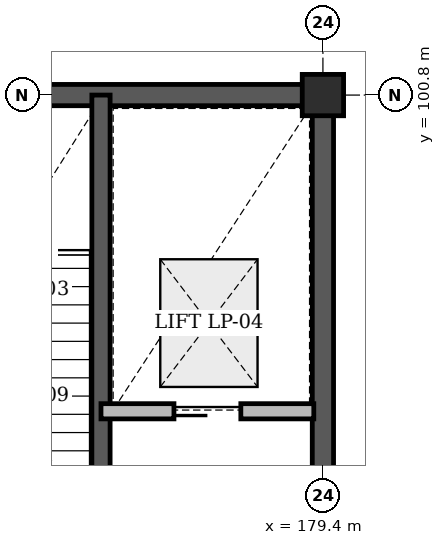
"""IFC4 building model, lengths in metres.
Left out: names, types, materials, properties, quantities, classifications, styles, units other than length and angle.
Written with IfcOpenShell. Run it as: python <this file> out.ifc"""

import sys

from ifc_helpers import new_model, si_unit, direction, frame, frame_2d, origin, origin_2d, place, context, subcontext, project, spatial, rectangle, extrude, element, fill, save


model = new_model("IFC4")
c1 = context("Model", 3, precision=1e-05, world=origin(), true_north=direction((0.0, 1.0)))
c2 = subcontext(c1, "Body", "Model", "MODEL_VIEW")
j1 = project(units=[si_unit("LENGTHUNIT", "METRE"), si_unit("PLANEANGLEUNIT", "RADIAN")], contexts=[c1])
p1 = place(None, origin())
s1 = spatial("IfcSite", under=j1, at=p1, CompositionType="ELEMENT")
p2 = place(p1, origin())
s2 = spatial("IfcBuilding", under=s1, at=p2, CompositionType="ELEMENT")
p3 = place(p2, frame((0.0, 0.0, 4.8)))
s3 = spatial("IfcBuildingStorey", under=s2, at=p3, CompositionType="ELEMENT", Elevation=4.8)
p4 = place(p3, frame((171.425, 100.8, 0.0), z_axis=(0.0, 0.0, 1.0), x_axis=(1.0, 0.0, 0.0)))
e1 = element("IfcWall", 1, at=p4, inside=s3, PredefinedType="SHEAR", context=c2, shape_type="SweptSolid", body=[
    extrude(rectangle(XDim=8.15, YDim=0.35, at=frame_2d((4.075, 0.0))), origin(), (0.0, 0.0, 1.0), 4.48),
])
p5 = place(p3, frame((179.4, 92.4, 0.0), z_axis=(0.0, 0.0, 1.0), x_axis=(0.0, 1.0, 0.0)))
e2 = element("IfcWall", 2, at=p5, inside=s3, PredefinedType="SHEAR", context=c2, shape_type="SweptSolid", body=[
    extrude(rectangle(XDim=8.4, YDim=0.35, at=frame_2d((4.2, 0.0))), origin(), (0.0, 0.0, 1.0), 4.48),
])
p6 = place(p3, frame((179.4, 100.8, 0.0), z_axis=(0.0, 0.0, 1.0), x_axis=(1.0, 0.0, 0.0)))
e3 = element("IfcColumn", 3, at=p6, inside=s3, PredefinedType="COLUMN", context=c2, shape_type="SweptSolid", body=[
    extrude(rectangle(XDim=0.68, YDim=0.68, at=origin_2d()), origin(), (0.0, 0.0, 1.0), 4.8),
])
p7 = place(p3, frame((175.75, 92.4, 0.0), z_axis=(0.0, 0.0, 1.0), x_axis=(0.0, 1.0, 0.0)))
e4 = element("IfcWall", 4, at=p7, inside=s3, PredefinedType="SHEAR", context=c2, shape_type="SweptSolid", body=[
    extrude(rectangle(XDim=8.4, YDim=0.3, at=frame_2d((4.2, 0.0))), origin(), (0.0, 0.0, 1.0), 4.8),
])
p8 = place(p3, frame((175.75, 95.6, 0.0), z_axis=(0.0, 0.0, 1.0), x_axis=(1.0, 0.0, 0.0)))
e5 = element("IfcWall", 5, at=p8, inside=s3, PredefinedType="STANDARD", context=c2, shape_type="SweptSolid", body=[
    extrude(rectangle(XDim=3.5, YDim=0.25, at=frame_2d((1.75, 0.0))), origin(), (0.0, 0.0, 1.0), 4.46),
])
p9 = place(p8, frame((1.2, 0.0, 0.0)))
e6 = element("IfcOpeningElement", 6, at=p9, cuts=e5, PredefinedType="OPENING", context=c2, shape_type="SweptSolid", body=[
    extrude(rectangle(XDim=1.1, YDim=2.2, at=frame_2d((0.55, 1.1))), frame((0.0, 0.135, 0.0), z_axis=(0.0, -1.0, 0.0), x_axis=(1.0, 0.0, 0.0)), (0.0, 0.0, 1.0), 0.27),
])
p10 = place(p9, origin())
e7 = element("IfcDoor", 7, at=p10, inside=s3, OperationType="SLIDING_TO_LEFT", PredefinedType="DOOR", context=c2, shape_type="SweptSolid", body=[
    extrude(rectangle(XDim=1.1, YDim=2.2, at=frame_2d((0.55, 1.1))), frame((0.0, 0.025, 0.0), z_axis=(0.0, -1.0, 0.0), x_axis=(1.0, 0.0, 0.0)), (0.0, 0.0, 1.0), 0.05),
])
fill(e6, e7)
save(model, sys.argv[1])
